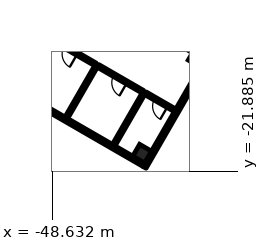
"""IFC4 building model, lengths in metres.
Left out: names, types, materials, properties, quantities, classifications, styles, units other than length and angle.
Written with IfcOpenShell. Run it as: python <this file> out.ifc"""

import sys

from ifc_helpers import new_model, si_unit, direction, frame, frame_2d, origin, origin_2d, place, context, subcontext, project, spatial, rectangle, extrude, element, fill, save


model = new_model("IFC4")
c1 = context("Model", 3, precision=1e-05, world=origin(), true_north=direction((0.0, 1.0)))
c2 = subcontext(c1, "Body", "Model", "MODEL_VIEW")
j1 = project(units=[si_unit("LENGTHUNIT", "METRE"), si_unit("PLANEANGLEUNIT", "RADIAN")], contexts=[c1])
p1 = place(None, origin())
s1 = spatial("IfcSite", under=j1, at=p1, CompositionType="ELEMENT")
p2 = place(p1, origin())
s2 = spatial("IfcBuilding", under=s1, at=p2, CompositionType="ELEMENT")
p3 = place(p2, frame((0.0, 0.0, 16.2)))
s3 = spatial("IfcBuildingStorey", under=s2, at=p3, CompositionType="ELEMENT", Elevation=16.2)
for number, where, z_axis, x_axis in (
    (1, (-39.061, -14.399, 0.0), (0.0, 0.0, 1.0), (-0.5, -0.866, 0.0)),
    (2, (-42.71, -20.721, 0.0), (0.0, 0.0, 1.0), (-0.5, -0.866, 0.0)),
):
    element("IfcColumn", number, at=place(p3, frame(where, z_axis=z_axis, x_axis=x_axis)), inside=s3, PredefinedType="COLUMN", context=c2, shape_type="SweptSolid", body=[
        extrude(rectangle(XDim=0.9, YDim=0.9, at=origin_2d()), origin(), (0.0, 0.0, 1.0), 5.4),
    ])
p4 = place(p3, frame((-38.25, -14.145, 0.0), z_axis=(0.0, 0.0, 1.0), x_axis=(-0.499999331568, -0.866025789703, 0.0)))
e3 = element("IfcWall", 3, at=p4, inside=s3, PredefinedType="SOLIDWALL", context=c2, shape_type="SweptSolid", body=[
    extrude(rectangle(XDim=8.625, YDim=0.25, at=frame_2d((4.312, 0.0))), origin(), (0.0, 0.0, 1.0), 5.0),
])
p5 = place(p3, frame((-42.608, -21.444, 0.0), z_axis=(0.0, 0.0, 1.0), x_axis=(-0.866025598446, 0.499999662836, 0.0)))
e4 = element("IfcWall", 4, at=p5, inside=s3, PredefinedType="SOLIDWALL", context=c2, shape_type="SweptSolid", body=[
    extrude(rectangle(XDim=18.5, YDim=0.25, at=frame_2d((9.25, 0.0))), origin(), (0.0, 0.0, 1.0), 5.0),
])
for number, where, z_axis, x_axis in (
    (5, (-42.581, -16.696, 0.0), (0.0, 0.0, 1.0), (-0.5, -0.866, 0.0)),
    (6, (-45.699, -14.896, 0.0), (0.0, 0.0, 1.0), (-0.5, -0.866, 0.0)),
):
    element("IfcWall", number, at=place(p3, frame(where, z_axis=z_axis, x_axis=x_axis)), inside=s3, PredefinedType="PARTITIONING", context=c2, shape_type="SweptSolid", body=[
        extrude(rectangle(XDim=4.0, YDim=0.2, at=frame_2d((2.0, 0.0))), origin(), (0.0, 0.0, 1.0), 4.1),
    ])
p6 = place(p3, frame((-40.546, -17.871, 0.0), z_axis=(0.0, 0.0, 1.0), x_axis=(-0.866017533419, 0.500013631625, 0.0)))
e7 = element("IfcWall", 7, at=p6, inside=s3, PredefinedType="PARTITIONING", context=c2, shape_type="SweptSolid", body=[
    extrude(rectangle(XDim=2.25, YDim=0.2, at=frame_2d((1.125, 0.0))), origin(), (0.0, 0.0, 1.0), 4.1),
])
p7 = place(p6, frame((0.55, 0.0, 0.0)))
e8 = element("IfcOpeningElement", 8, at=p7, cuts=e7, PredefinedType="OPENING", context=c2, shape_type="SweptSolid", body=[
    extrude(rectangle(XDim=1.0, YDim=2.1, at=frame_2d((0.5, 1.05))), frame((0.0, 0.11, 0.0), z_axis=(0.0, -1.0, 0.0), x_axis=(1.0, 0.0, 0.0)), (0.0, 0.0, 1.0), 0.22),
])
p8 = place(p3, frame((-42.667, -16.646, 0.0), z_axis=(0.0, 0.0, 1.0), x_axis=(-0.866007419912, 0.500031147688, 0.0)))
e9 = element("IfcWall", 9, at=p8, inside=s3, PredefinedType="PARTITIONING", context=c2, shape_type="SweptSolid", body=[
    extrude(rectangle(XDim=3.4, YDim=0.2, at=frame_2d((1.7, 0.0))), origin(), (0.0, 0.0, 1.0), 4.1),
])
p9 = place(p8, frame((1.2, 0.0, 0.0)))
e10 = element("IfcOpeningElement", 10, at=p9, cuts=e9, PredefinedType="OPENING", context=c2, shape_type="SweptSolid", body=[
    extrude(rectangle(XDim=1.0, YDim=2.1, at=frame_2d((0.5, 1.05))), frame((0.0, 0.11, 0.0), z_axis=(0.0, -1.0, 0.0), x_axis=(1.0, 0.0, 0.0)), (0.0, 0.0, 1.0), 0.22),
])
p10 = place(p3, frame((-45.785, -14.846, 0.0), z_axis=(0.0, 0.0, 1.0), x_axis=(-0.866022959057, 0.500004234368, 0.0)))
e11 = element("IfcWall", 11, at=p10, inside=s3, PredefinedType="PARTITIONING", context=c2, shape_type="SweptSolid", body=[
    extrude(rectangle(XDim=3.75, YDim=0.2, at=frame_2d((1.875, 0.0))), origin(), (0.0, 0.0, 1.0), 4.1),
])
p11 = place(p10, frame((1.375, 0.0, 0.0)))
e12 = element("IfcOpeningElement", 12, at=p11, cuts=e11, PredefinedType="OPENING", context=c2, shape_type="SweptSolid", body=[
    extrude(rectangle(XDim=1.0, YDim=2.1, at=frame_2d((0.5, 1.05))), frame((0.0, 0.11, 0.0), z_axis=(0.0, -1.0, 0.0), x_axis=(1.0, 0.0, 0.0)), (0.0, 0.0, 1.0), 0.22),
])
p12 = place(p3, frame((-38.358, -14.083, 0.0), z_axis=(0.0, 0.0, 1.0), x_axis=(-0.866024244032, 0.500002008745, 0.0)))
e13 = element("IfcWall", 13, at=p12, inside=s3, PredefinedType="PARTITIONING", context=c2, shape_type="SweptSolid", body=[
    extrude(rectangle(XDim=47.5, YDim=0.2, at=frame_2d((23.75, 0.0))), origin(), (0.0, 0.0, 1.0), 4.1),
])
p13 = place(p7, origin())
e14 = element("IfcDoor", 14, at=p13, inside=s3, OperationType="SINGLE_SWING_LEFT", PredefinedType="DOOR", context=c2, shape_type="SweptSolid", body=[
    extrude(rectangle(XDim=1.0, YDim=2.1, at=frame_2d((0.5, 1.05))), frame((0.0, 0.025, 0.0), z_axis=(0.0, -1.0, 0.0), x_axis=(1.0, 0.0, 0.0)), (0.0, 0.0, 1.0), 0.05),
])
fill(e8, e14)
p14 = place(p9, origin())
e15 = element("IfcDoor", 15, at=p14, inside=s3, OperationType="SINGLE_SWING_LEFT", PredefinedType="DOOR", context=c2, shape_type="SweptSolid", body=[
    extrude(rectangle(XDim=1.0, YDim=2.1, at=frame_2d((0.5, 1.05))), frame((0.0, 0.025, 0.0), z_axis=(0.0, -1.0, 0.0), x_axis=(1.0, 0.0, 0.0)), (0.0, 0.0, 1.0), 0.05),
])
fill(e10, e15)
p15 = place(p11, origin())
e16 = element("IfcDoor", 16, at=p15, inside=s3, OperationType="SINGLE_SWING_LEFT", PredefinedType="DOOR", context=c2, shape_type="SweptSolid", body=[
    extrude(rectangle(XDim=1.0, YDim=2.1, at=frame_2d((0.5, 1.05))), frame((0.0, 0.025, 0.0), z_axis=(0.0, -1.0, 0.0), x_axis=(1.0, 0.0, 0.0)), (0.0, 0.0, 1.0), 0.05),
])
fill(e12, e16)
save(model, sys.argv[1])
